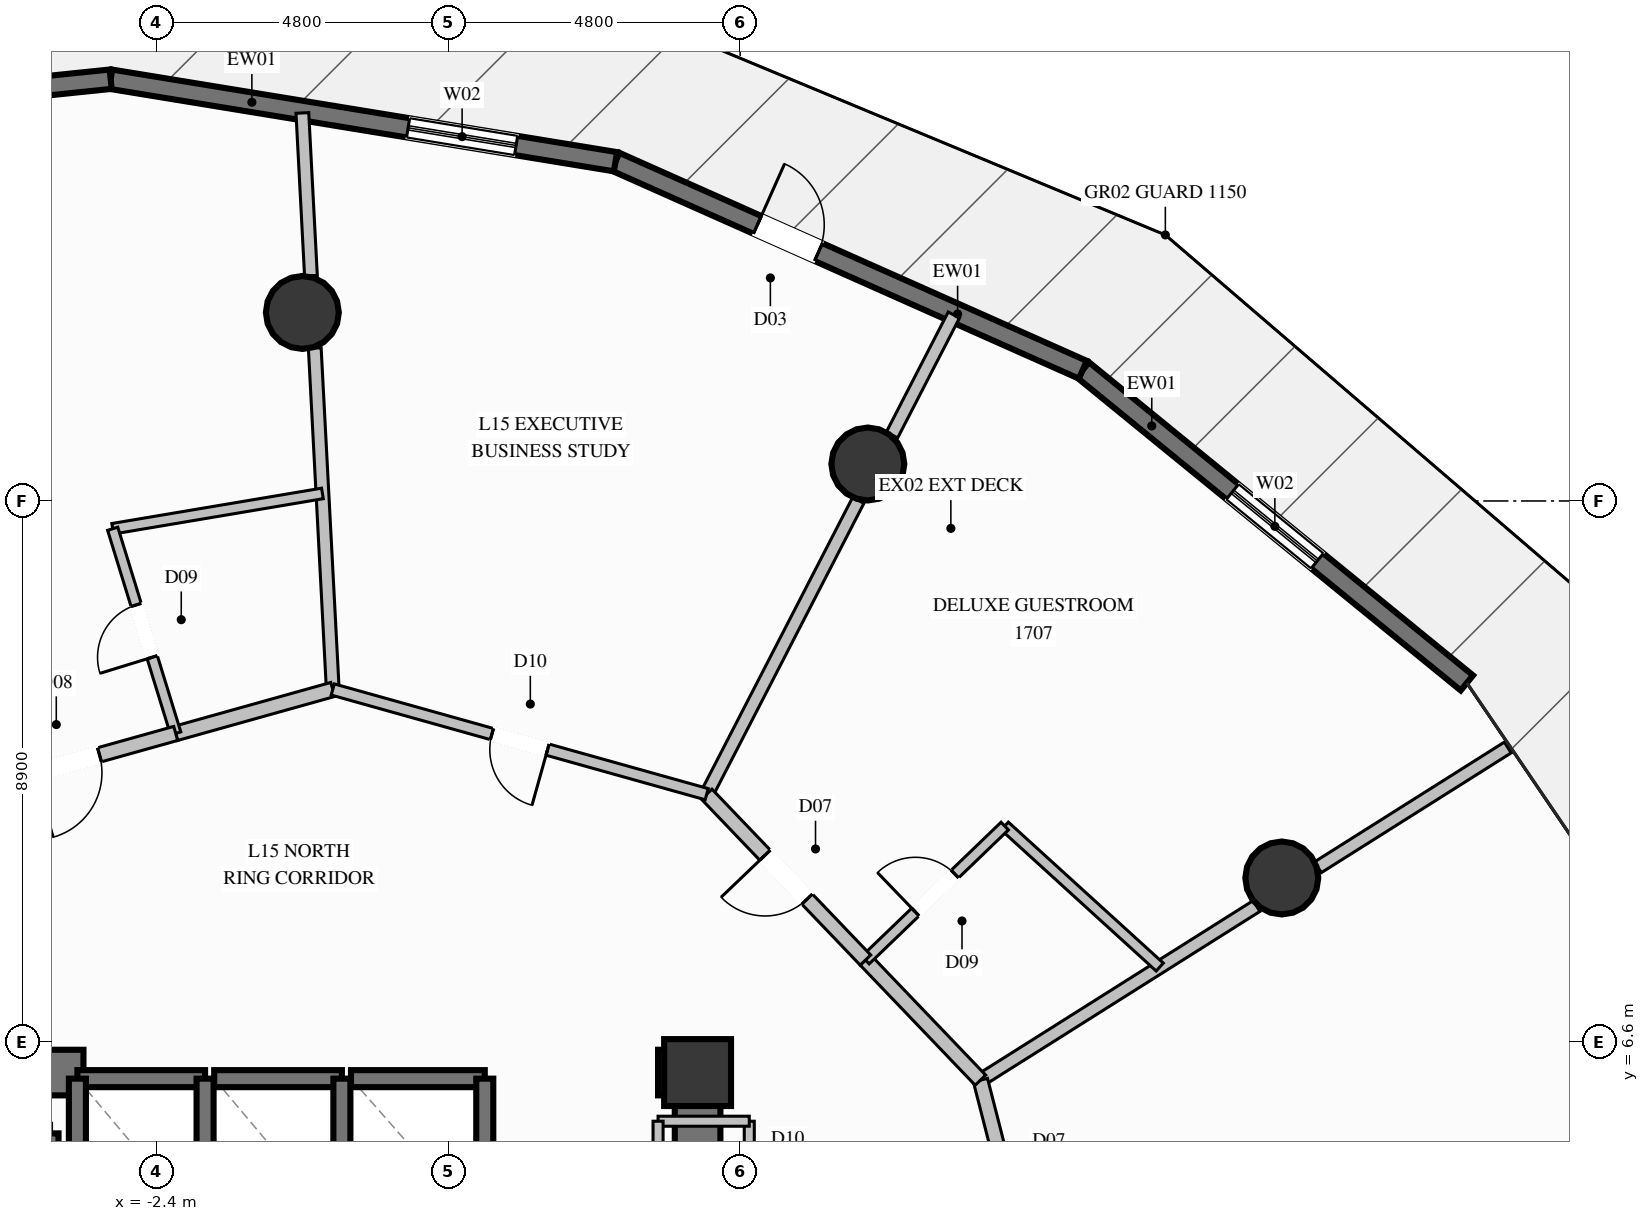
"""IFC4 building model, lengths in metres.
Left out: names, types, materials, properties, quantities, classifications, styles, units other than length and angle.
Written with IfcOpenShell. Run it as: python <this file> out.ifc"""

import sys

from ifc_helpers import new_model, si_unit, direction, frame, frame_2d, origin, origin_2d, place, context, subcontext, project, spatial, rectangle, circle, extrude, element, fill, save


model = new_model("IFC4")
c1 = context("Model", 3, precision=1e-05, world=origin(), true_north=direction((0.0, 1.0)))
c2 = subcontext(c1, "Body", "Model", "MODEL_VIEW")
j1 = project(units=[si_unit("LENGTHUNIT", "METRE"), si_unit("PLANEANGLEUNIT", "RADIAN")], contexts=[c1])
p1 = place(None, origin())
s1 = spatial("IfcSite", under=j1, at=p1, CompositionType="ELEMENT")
p2 = place(p1, origin())
s2 = spatial("IfcBuilding", under=s1, at=p2, CompositionType="ELEMENT")
p3 = place(p2, frame((0.0, 0.0, 64.4)))
s3 = spatial("IfcBuildingStorey", under=s2, at=p3, CompositionType="ELEMENT", Elevation=64.4)
p4 = place(p3, frame((6.5, 6.1, 0.0), z_axis=(0.0, 0.0, 1.0), x_axis=(1.0, 0.0, 0.0)))
e1 = element("IfcColumn", 1, at=p4, inside=s3, PredefinedType="COLUMN", context=c2, shape_type="SweptSolid", body=[
    extrude(rectangle(XDim=1.1, YDim=1.1, at=origin_2d()), origin(), (0.0, 0.0, 1.0), 3.6),
])
p5 = place(p3, frame((-6.125, 6.1, 0.0), z_axis=(0.0, 0.0, 1.0), x_axis=(1.0, 0.0, 0.0)))
e2 = element("IfcWall", 2, at=p5, inside=s3, PredefinedType="SHEAR", context=c2, shape_type="SweptSolid", body=[
    extrude(rectangle(XDim=2.525, YDim=0.75, at=frame_2d((1.262, 0.0))), origin(), (0.0, 0.0, 1.0), 3.6),
])
p6 = place(p3, frame((5.85, 6.1, 0.0), z_axis=(0.0, 0.0, 1.0), x_axis=(1.0, 0.0, 0.0)))
e3 = element("IfcWall", 3, at=p6, inside=s3, PredefinedType="SHEAR", context=c2, shape_type="SweptSolid", body=[
    extrude(rectangle(XDim=0.275, YDim=0.75, at=frame_2d((0.137, 0.0))), origin(), (0.0, 0.0, 1.0), 3.6),
])
p7 = place(p3, frame((6.5, 3.35, 0.0), z_axis=(0.0, 0.0, 1.0), x_axis=(0.0, 1.0, 0.0)))
e4 = element("IfcWall", 4, at=p7, inside=s3, PredefinedType="SHEAR", context=c2, shape_type="SweptSolid", body=[
    extrude(rectangle(XDim=3.125, YDim=0.75, at=frame_2d((1.562, 0.0))), origin(), (0.0, 0.0, 1.0), 3.6),
])
for number, where, z_axis, x_axis in (
    (5, (16.108, 9.3, 0.0), (0.0, 0.0, 1.0), (1.0, 0.0, 0.0)),
    (6, (9.3, 16.108, 0.0), (0.0, 0.0, 1.0), (1.0, 0.0, 0.0)),
    (7, (0.0, 18.6, 0.0), (0.0, 0.0, 1.0), (1.0, 0.0, 0.0)),
):
    element("IfcColumn", number, at=place(p3, frame(where, z_axis=z_axis, x_axis=x_axis)), inside=s3, PredefinedType="COLUMN", context=c2, shape_type="SweptSolid", body=[
        extrude(circle(Radius=0.6, at=origin_2d()), origin(), (0.0, 0.0, 1.0), 3.6),
    ])
p8 = place(p3, frame((12.836, 17.658, 0.0), z_axis=(0.0, 0.0, 1.0), x_axis=(0.775030651079, -0.631923642451, 0.0)))
e8 = element("IfcWall", 8, at=p8, inside=s3, PredefinedType="SOLIDWALL", context=c2, shape_type="SweptSolid", body=[
    extrude(rectangle(XDim=8.15, YDim=0.32, at=frame_2d((4.075, 0.0))), origin(), (0.0, 0.0, 1.0), 3.34),
])
p9 = place(p8, frame((3.175, 0.0, 0.35)))
e9 = element("IfcOpeningElement", 9, at=p9, cuts=e8, PredefinedType="OPENING", context=c2, shape_type="SweptSolid", body=[
    extrude(rectangle(XDim=1.8, YDim=2.6, at=frame_2d((0.9, 1.3))), frame((0.0, 0.17, 0.0), z_axis=(0.0, -1.0, 0.0), x_axis=(1.0, 0.0, 0.0)), (0.0, 0.0, 1.0), 0.34),
])
p10 = place(p3, frame((5.15, 21.079, 0.0), z_axis=(0.0, 0.0, 1.0), x_axis=(0.913585235978, -0.406647287712, 0.0)))
e10 = element("IfcWall", 10, at=p10, inside=s3, PredefinedType="SOLIDWALL", context=c2, shape_type="SweptSolid", body=[
    extrude(rectangle(XDim=8.413, YDim=0.32, at=frame_2d((4.207, 0.0))), origin(), (0.0, 0.0, 1.0), 3.34),
])
p11 = place(p10, frame((2.554, 0.0, 0.0)))
e11 = element("IfcOpeningElement", 11, at=p11, cuts=e10, PredefinedType="OPENING", context=c2, shape_type="SweptSolid", body=[
    extrude(rectangle(XDim=1.1, YDim=2.2, at=frame_2d((0.55, 1.1))), frame((0.0, 0.17, 0.0), z_axis=(0.0, -1.0, 0.0), x_axis=(1.0, 0.0, 0.0)), (0.0, 0.0, 1.0), 0.34),
])
p12 = place(p3, frame((-3.153, 22.436, 0.0), z_axis=(0.0, 0.0, 1.0), x_axis=(0.986907440065, -0.161287645973, 0.0)))
e12 = element("IfcWall", 12, at=p12, inside=s3, PredefinedType="SOLIDWALL", context=c2, shape_type="SweptSolid", body=[
    extrude(rectangle(XDim=8.413, YDim=0.32, at=frame_2d((4.207, 0.0))), origin(), (0.0, 0.0, 1.0), 3.34),
])
p13 = place(p12, frame((4.957, 0.0, 0.35)))
e13 = element("IfcOpeningElement", 13, at=p13, cuts=e12, PredefinedType="OPENING", context=c2, shape_type="SweptSolid", body=[
    extrude(rectangle(XDim=1.8, YDim=2.6, at=frame_2d((0.9, 1.3))), frame((0.0, 0.17, 0.0), z_axis=(0.0, -1.0, 0.0), x_axis=(1.0, 0.0, 0.0)), (0.0, 0.0, 1.0), 0.34),
])
p14 = place(p3, frame((-11.259, 21.598, 0.0), z_axis=(0.0, 0.0, 1.0), x_axis=(0.994696973701, 0.102849066644, 0.0)))
e14 = element("IfcWall", 14, at=p14, inside=s3, PredefinedType="SOLIDWALL", context=c2, shape_type="SweptSolid", body=[
    extrude(rectangle(XDim=8.149, YDim=0.32, at=frame_2d((4.075, 0.0))), origin(), (0.0, 0.0, 1.0), 3.34),
])
p15 = place(p14, frame((3.175, 0.0, 0.35)))
e15 = element("IfcOpeningElement", 15, at=p15, cuts=e14, PredefinedType="OPENING", context=c2, shape_type="SweptSolid", body=[
    extrude(rectangle(XDim=1.8, YDim=2.6, at=frame_2d((0.9, 1.3))), frame((0.0, 0.17, 0.0), z_axis=(0.0, -1.0, 0.0), x_axis=(1.0, 0.0, 0.0)), (0.0, 0.0, 1.0), 0.34),
])
p16 = place(p3, frame((-1.6, 6.0, 0.0), z_axis=(0.0, 0.0, 1.0), x_axis=(-1.0, 0.0, 0.0)))
e16 = element("IfcWall", 16, at=p16, inside=s3, PredefinedType="SOLIDWALL", context=c2, shape_type="SweptSolid", body=[
    extrude(rectangle(XDim=2.1, YDim=0.28, at=frame_2d((1.05, 0.0))), origin(), (0.0, 0.0, 1.0), 3.34),
])
for number, where, z_axis, x_axis in (
    (17, (-3.7, 6.0, 0.0), (0.0, 0.0, 1.0), (0.0, -1.0, 0.0)),
    (18, (-1.6, 3.5, 0.0), (0.0, 0.0, 1.0), (0.0, 1.0, 0.0)),
):
    element("IfcWall", number, at=place(p3, frame(where, z_axis=z_axis, x_axis=x_axis)), inside=s3, PredefinedType="SOLIDWALL", context=c2, shape_type="SweptSolid", body=[
        extrude(rectangle(XDim=2.5, YDim=0.28, at=frame_2d((1.25, 0.0))), origin(), (0.0, 0.0, 1.0), 3.34),
    ])
p17 = place(p3, frame((0.65, 6.0, 0.0), z_axis=(0.0, 0.0, 1.0), x_axis=(-1.0, 0.0, 0.0)))
e19 = element("IfcWall", 19, at=p17, inside=s3, PredefinedType="SOLIDWALL", context=c2, shape_type="SweptSolid", body=[
    extrude(rectangle(XDim=2.1, YDim=0.28, at=frame_2d((1.05, 0.0))), origin(), (0.0, 0.0, 1.0), 3.34),
])
p18 = place(p3, frame((0.65, 3.5, 0.0), z_axis=(0.0, 0.0, 1.0), x_axis=(0.0, 1.0, 0.0)))
e20 = element("IfcWall", 20, at=p18, inside=s3, PredefinedType="SOLIDWALL", context=c2, shape_type="SweptSolid", body=[
    extrude(rectangle(XDim=2.5, YDim=0.28, at=frame_2d((1.25, 0.0))), origin(), (0.0, 0.0, 1.0), 3.34),
])
p19 = place(p3, frame((3.0, 6.0, 0.0), z_axis=(0.0, 0.0, 1.0), x_axis=(-1.0, 0.0, 0.0)))
e21 = element("IfcWall", 21, at=p19, inside=s3, PredefinedType="SOLIDWALL", context=c2, shape_type="SweptSolid", body=[
    extrude(rectangle(XDim=2.2, YDim=0.28, at=frame_2d((1.1, 0.0))), origin(), (0.0, 0.0, 1.0), 3.34),
])
p20 = place(p3, frame((3.0, 3.5, 0.0), z_axis=(0.0, 0.0, 1.0), x_axis=(0.0, 1.0, 0.0)))
e22 = element("IfcWall", 22, at=p20, inside=s3, PredefinedType="SOLIDWALL", context=c2, shape_type="SweptSolid", body=[
    extrude(rectangle(XDim=2.5, YDim=0.28, at=frame_2d((1.25, 0.0))), origin(), (0.0, 0.0, 1.0), 3.34),
])
p21 = place(p3, frame((-4.15, 2.4, 0.0), z_axis=(0.0, 0.0, 1.0), x_axis=(0.0, 1.0, 0.0)))
e23 = element("IfcWall", 23, at=p21, inside=s3, PredefinedType="SOLIDWALL", context=c2, shape_type="SweptSolid", body=[
    extrude(rectangle(XDim=2.7, YDim=0.28, at=frame_2d((1.35, 0.0))), origin(), (0.0, 0.0, 1.0), 3.34),
])
p22 = place(p3, frame((7.35, 3.35, 0.0), z_axis=(0.0, 0.0, 1.0), x_axis=(0.0, 1.0, 0.0)))
e24 = element("IfcWall", 24, at=p22, inside=s3, PredefinedType="PARTITIONING", context=c2, shape_type="SweptSolid", body=[
    extrude(rectangle(XDim=1.95, YDim=0.165, at=frame_2d((0.975, 0.0))), origin(), (0.0, 0.0, 1.0), 3.34),
])
p23 = place(p22, frame((0.5, 0.0, 0.0)))
e25 = element("IfcOpeningElement", 25, at=p23, cuts=e24, PredefinedType="OPENING", context=c2, shape_type="SweptSolid", body=[
    extrude(rectangle(XDim=0.95, YDim=2.1, at=frame_2d((0.475, 1.05))), frame((0.0, 0.093, 0.0), z_axis=(0.0, -1.0, 0.0), x_axis=(1.0, 0.0, 0.0)), (0.0, 0.0, 1.0), 0.185),
])
p24 = place(p3, frame((7.35, 5.3, 0.0), z_axis=(0.0, 0.0, 1.0), x_axis=(-1.0, 0.0, 0.0)))
e26 = element("IfcWall", 26, at=p24, inside=s3, PredefinedType="PARTITIONING", context=c2, shape_type="SweptSolid", body=[
    extrude(rectangle(XDim=1.5, YDim=0.165, at=frame_2d((0.75, 0.0))), origin(), (0.0, 0.0, 1.0), 2.425),
])
p25 = place(p3, frame((5.85, 5.3, 0.0), z_axis=(0.0, 0.0, 1.0), x_axis=(0.0, -1.0, 0.0)))
e27 = element("IfcWall", 27, at=p25, inside=s3, PredefinedType="PARTITIONING", context=c2, shape_type="SweptSolid", body=[
    extrude(rectangle(XDim=1.95, YDim=0.165, at=frame_2d((0.975, 0.0))), origin(), (0.0, 0.0, 1.0), 2.425),
])
p26 = place(p3, frame((11.152, 5.975, 0.0), z_axis=(0.0, 0.0, 1.0), x_axis=(0.845824796296, 0.533460789535, 0.0)))
e28 = element("IfcWall", 28, at=p26, inside=s3, PredefinedType="PARTITIONING", context=c2, shape_type="SweptSolid", body=[
    extrude(rectangle(XDim=5.369, YDim=0.21, at=frame_2d((2.684, 0.0))), origin(), (0.0, 0.0, 1.0), 2.708),
])
p27 = place(p3, frame((16.702, 9.476, 0.0), z_axis=(0.0, 0.0, 1.0), x_axis=(0.845791996805, 0.533512790981, 0.0)))
e29 = element("IfcWall", 29, at=p27, inside=s3, PredefinedType="PARTITIONING", context=c2, shape_type="SweptSolid", body=[
    extrude(rectangle(XDim=3.692, YDim=0.21, at=frame_2d((1.846, 0.0))), origin(), (0.0, 0.0, 1.0), 3.34),
])
p28 = place(p3, frame((6.65, 10.678, 0.0), z_axis=(0.0, 0.0, 1.0), x_axis=(0.458459867615, 0.888715111713, 0.0)))
e30 = element("IfcWall", 30, at=p28, inside=s3, PredefinedType="PARTITIONING", context=c2, shape_type="SweptSolid", body=[
    extrude(rectangle(XDim=5.436, YDim=0.21, at=frame_2d((2.718, 0.0))), origin(), (0.0, 0.0, 1.0), 2.708),
])
p29 = place(p3, frame((9.697, 16.585, 0.0), z_axis=(0.0, 0.0, 1.0), x_axis=(0.458346114294, 0.888773784217, 0.0)))
e31 = element("IfcWall", 31, at=p29, inside=s3, PredefinedType="PARTITIONING", context=c2, shape_type="SweptSolid", body=[
    extrude(rectangle(XDim=2.221, YDim=0.21, at=frame_2d((1.111, 0.0))), origin(), (0.0, 0.0, 1.0), 3.34),
])
p30 = place(p3, frame((0.5, 12.4, 0.0), z_axis=(0.0, 0.0, 1.0), x_axis=(-0.052634051211, 0.998613867645, 0.0)))
e32 = element("IfcWall", 32, at=p30, inside=s3, PredefinedType="PARTITIONING", context=c2, shape_type="SweptSolid", body=[
    extrude(rectangle(XDim=5.622, YDim=0.21, at=frame_2d((2.811, 0.0))), origin(), (0.0, 0.0, 1.0), 2.708),
])
p31 = place(p3, frame((0.141, 19.204, 0.0), z_axis=(0.0, 0.0, 1.0), x_axis=(-0.052640094062, 0.998613549126, 0.0)))
e33 = element("IfcWall", 33, at=p31, inside=s3, PredefinedType="PARTITIONING", context=c2, shape_type="SweptSolid", body=[
    extrude(rectangle(XDim=2.681, YDim=0.21, at=frame_2d((1.34, 0.0))), origin(), (0.0, 0.0, 1.0), 3.34),
])
p32 = place(p3, frame((0.5, 12.4, 0.0), z_axis=(0.0, 0.0, 1.0), x_axis=(-0.962997098558, -0.269511758869, 0.0)))
e34 = element("IfcWall", 34, at=p32, inside=s3, PredefinedType="PARTITIONING", context=c2, shape_type="SweptSolid", body=[
    extrude(rectangle(XDim=2.682, YDim=0.24, at=frame_2d((1.341, 0.0))), origin(), (0.0, 0.0, 1.0), 2.917),
])
p33 = place(p3, frame((0.33, 15.624, 0.0), z_axis=(0.0, 0.0, 1.0), x_axis=(-0.986103759575, -0.166130597281, 0.0)))
e35 = element("IfcWall", 35, at=p33, inside=s3, PredefinedType="PLUMBINGWALL", context=c2, shape_type="SweptSolid", body=[
    extrude(rectangle(XDim=3.498, YDim=0.175, at=frame_2d((1.749, 0.0))), origin(), (0.0, 0.0, 1.0), 3.34),
])
p34 = place(p3, frame((-2.083, 11.677, 0.0), z_axis=(0.0, 0.0, 1.0), x_axis=(-0.294139433535, 0.955762519478, 0.0)))
e36 = element("IfcWall", 36, at=p34, inside=s3, PredefinedType="PLUMBINGWALL", context=c2, shape_type="SweptSolid", body=[
    extrude(rectangle(XDim=3.522, YDim=0.175, at=frame_2d((1.761, 0.0))), origin(), (0.0, 0.0, 1.0), 3.34),
])
p35 = place(p34, frame((1.311, 0.0, 0.0)))
e37 = element("IfcOpeningElement", 37, at=p35, cuts=e36, PredefinedType="OPENING", context=c2, shape_type="SweptSolid", body=[
    extrude(rectangle(XDim=0.9, YDim=2.1, at=frame_2d((0.45, 1.05))), frame((0.0, 0.098, 0.0), z_axis=(0.0, -1.0, 0.0), x_axis=(1.0, 0.0, 0.0)), (0.0, 0.0, 1.0), 0.195),
])
p36 = place(p3, frame((-2.083, 11.677, 0.0), z_axis=(0.0, 0.0, 1.0), x_axis=(-0.962943481199, -0.269703266603, 0.0)))
e38 = element("IfcWall", 38, at=p36, inside=s3, PredefinedType="PARTITIONING", context=c2, shape_type="SweptSolid", body=[
    extrude(rectangle(XDim=3.704, YDim=0.24, at=frame_2d((1.852, 0.0))), origin(), (0.0, 0.0, 1.0), 2.917),
])
p37 = place(p36, frame((1.302, 0.0, 0.0)))
e39 = element("IfcOpeningElement", 39, at=p37, cuts=e38, PredefinedType="OPENING", context=c2, shape_type="SweptSolid", body=[
    extrude(rectangle(XDim=1.1, YDim=2.3, at=frame_2d((0.55, 1.15))), frame((0.0, 0.13, 0.0), z_axis=(0.0, -1.0, 0.0), x_axis=(1.0, 0.0, 0.0)), (0.0, 0.0, 1.0), 0.26),
])
p38 = place(p3, frame((12.108, 2.248, 0.0), z_axis=(0.0, 0.0, 1.0), x_axis=(-0.248413515056, 0.9686540794, 0.0)))
e40 = element("IfcWall", 40, at=p38, inside=s3, PredefinedType="PARTITIONING", context=c2, shape_type="SweptSolid", body=[
    extrude(rectangle(XDim=3.848, YDim=0.24, at=frame_2d((1.924, 0.0))), origin(), (0.0, 0.0, 1.0), 2.917),
])
p39 = place(p38, frame((1.424, 0.0, 0.0)))
e41 = element("IfcOpeningElement", 41, at=p39, cuts=e40, PredefinedType="OPENING", context=c2, shape_type="SweptSolid", body=[
    extrude(rectangle(XDim=1.0, YDim=2.2, at=frame_2d((0.5, 1.1))), frame((0.0, 0.13, 0.0), z_axis=(0.0, -1.0, 0.0), x_axis=(1.0, 0.0, 0.0)), (0.0, 0.0, 1.0), 0.26),
])
p40 = place(p3, frame((11.152, 5.975, 0.0), z_axis=(0.0, 0.0, 1.0), x_axis=(-0.69162799291, 0.72225391617, 0.0)))
e42 = element("IfcWall", 42, at=p40, inside=s3, PredefinedType="PARTITIONING", context=c2, shape_type="SweptSolid", body=[
    extrude(rectangle(XDim=2.734, YDim=0.24, at=frame_2d((1.367, 0.0))), origin(), (0.0, 0.0, 1.0), 3.34),
])
p41 = place(p3, frame((14.101, 7.835, 0.0), z_axis=(0.0, 0.0, 1.0), x_axis=(-0.739686776135, 0.672951315632, 0.0)))
e43 = element("IfcWall", 43, at=p41, inside=s3, PredefinedType="PLUMBINGWALL", context=c2, shape_type="SweptSolid", body=[
    extrude(rectangle(XDim=3.446, YDim=0.175, at=frame_2d((1.723, 0.0))), origin(), (0.0, 0.0, 1.0), 3.34),
])
p42 = place(p3, frame((9.261, 7.95, 0.0), z_axis=(0.0, 0.0, 1.0), x_axis=(0.720644149621, 0.693305134567, 0.0)))
e44 = element("IfcWall", 44, at=p42, inside=s3, PredefinedType="PLUMBINGWALL", context=c2, shape_type="SweptSolid", body=[
    extrude(rectangle(XDim=3.179, YDim=0.175, at=frame_2d((1.59, 0.0))), origin(), (0.0, 0.0, 1.0), 3.34),
])
p43 = place(p42, frame((1.14, 0.0, 0.0)))
e45 = element("IfcOpeningElement", 45, at=p43, cuts=e44, PredefinedType="OPENING", context=c2, shape_type="SweptSolid", body=[
    extrude(rectangle(XDim=0.9, YDim=2.1, at=frame_2d((0.45, 1.05))), frame((0.0, 0.098, 0.0), z_axis=(0.0, -1.0, 0.0), x_axis=(1.0, 0.0, 0.0)), (0.0, 0.0, 1.0), 0.195),
])
p44 = place(p3, frame((9.261, 7.95, 0.0), z_axis=(0.0, 0.0, 1.0), x_axis=(-0.691453073155, 0.722421378161, 0.0)))
e46 = element("IfcWall", 46, at=p44, inside=s3, PredefinedType="PARTITIONING", context=c2, shape_type="SweptSolid", body=[
    extrude(rectangle(XDim=3.776, YDim=0.24, at=frame_2d((1.888, 0.0))), origin(), (0.0, 0.0, 1.0), 3.34),
])
p45 = place(p44, frame((1.388, 0.0, 0.0)))
e47 = element("IfcOpeningElement", 47, at=p45, cuts=e46, PredefinedType="OPENING", context=c2, shape_type="SweptSolid", body=[
    extrude(rectangle(XDim=1.0, YDim=2.2, at=frame_2d((0.5, 1.1))), frame((0.0, 0.13, 0.0), z_axis=(0.0, -1.0, 0.0), x_axis=(1.0, 0.0, 0.0)), (0.0, 0.0, 1.0), 0.26),
])
p46 = place(p3, frame((6.65, 10.678, 0.0), z_axis=(0.0, 0.0, 1.0), x_axis=(-0.962966004827, 0.26962283573, 0.0)))
e48 = element("IfcWall", 48, at=p46, inside=s3, PredefinedType="PARTITIONING", context=c2, shape_type="SweptSolid", body=[
    extrude(rectangle(XDim=6.386, YDim=0.19, at=frame_2d((3.193, 0.0))), origin(), (0.0, 0.0, 1.0), 2.917),
])
p47 = place(p46, frame((2.718, 0.0, 0.0)))
e49 = element("IfcOpeningElement", 49, at=p47, cuts=e48, PredefinedType="OPENING", context=c2, shape_type="SweptSolid", body=[
    extrude(rectangle(XDim=0.95, YDim=2.1, at=frame_2d((0.475, 1.05))), frame((0.0, 0.105, 0.0), z_axis=(0.0, -1.0, 0.0), x_axis=(1.0, 0.0, 0.0)), (0.0, 0.0, 1.0), 0.21),
])
p48 = place(p9, origin())
e50 = element("IfcWindow", 50, at=p48, inside=s3, PartitioningType="SINGLE_PANEL", PredefinedType="WINDOW", context=c2, shape_type="SweptSolid", body=[
    extrude(rectangle(XDim=1.8, YDim=2.6, at=frame_2d((0.9, 1.3))), frame((0.0, 0.03, 0.0), z_axis=(0.0, -1.0, 0.0), x_axis=(1.0, 0.0, 0.0)), (0.0, 0.0, 1.0), 0.06),
])
fill(e9, e50)
p49 = place(p11, origin())
e51 = element("IfcDoor", 51, at=p49, inside=s3, OperationType="SINGLE_SWING_LEFT", PredefinedType="DOOR", context=c2, shape_type="SweptSolid", body=[
    extrude(rectangle(XDim=1.1, YDim=2.2, at=frame_2d((0.55, 1.1))), frame((0.0, 0.025, 0.0), z_axis=(0.0, -1.0, 0.0), x_axis=(1.0, 0.0, 0.0)), (0.0, 0.0, 1.0), 0.05),
])
fill(e11, e51)
p50 = place(p13, origin())
e52 = element("IfcWindow", 52, at=p50, inside=s3, PartitioningType="SINGLE_PANEL", PredefinedType="WINDOW", context=c2, shape_type="SweptSolid", body=[
    extrude(rectangle(XDim=1.8, YDim=2.6, at=frame_2d((0.9, 1.3))), frame((0.0, 0.03, 0.0), z_axis=(0.0, -1.0, 0.0), x_axis=(1.0, 0.0, 0.0)), (0.0, 0.0, 1.0), 0.06),
])
fill(e13, e52)
p51 = place(p35, origin())
e53 = element("IfcDoor", 53, at=p51, inside=s3, OperationType="SINGLE_SWING_LEFT", PredefinedType="DOOR", context=c2, shape_type="SweptSolid", body=[
    extrude(rectangle(XDim=0.9, YDim=2.1, at=frame_2d((0.45, 1.05))), frame((0.0, 0.025, 0.0), z_axis=(0.0, -1.0, 0.0), x_axis=(1.0, 0.0, 0.0)), (0.0, 0.0, 1.0), 0.05),
])
fill(e37, e53)
p52 = place(p37, origin())
e54 = element("IfcDoor", 54, at=p52, inside=s3, OperationType="SINGLE_SWING_RIGHT", PredefinedType="DOOR", context=c2, shape_type="SweptSolid", body=[
    extrude(rectangle(XDim=1.1, YDim=2.3, at=frame_2d((0.55, 1.15))), frame((0.0, 0.025, 0.0), z_axis=(0.0, -1.0, 0.0), x_axis=(1.0, 0.0, 0.0)), (0.0, 0.0, 1.0), 0.05),
])
fill(e39, e54)
p53 = place(p43, origin())
e55 = element("IfcDoor", 55, at=p53, inside=s3, OperationType="SINGLE_SWING_LEFT", PredefinedType="DOOR", context=c2, shape_type="SweptSolid", body=[
    extrude(rectangle(XDim=0.9, YDim=2.1, at=frame_2d((0.45, 1.05))), frame((0.0, 0.025, 0.0), z_axis=(0.0, -1.0, 0.0), x_axis=(1.0, 0.0, 0.0)), (0.0, 0.0, 1.0), 0.05),
])
fill(e45, e55)
p54 = place(p45, origin())
e56 = element("IfcDoor", 56, at=p54, inside=s3, OperationType="SINGLE_SWING_RIGHT", PredefinedType="DOOR", context=c2, shape_type="SweptSolid", body=[
    extrude(rectangle(XDim=1.0, YDim=2.2, at=frame_2d((0.5, 1.1))), frame((0.0, 0.025, 0.0), z_axis=(0.0, -1.0, 0.0), x_axis=(1.0, 0.0, 0.0)), (0.0, 0.0, 1.0), 0.05),
])
fill(e47, e56)
p55 = place(p47, origin())
e57 = element("IfcDoor", 57, at=p55, inside=s3, OperationType="SINGLE_SWING_LEFT", PredefinedType="DOOR", context=c2, shape_type="SweptSolid", body=[
    extrude(rectangle(XDim=0.95, YDim=2.1, at=frame_2d((0.475, 1.05))), frame((0.0, 0.025, 0.0), z_axis=(0.0, -1.0, 0.0), x_axis=(1.0, 0.0, 0.0)), (0.0, 0.0, 1.0), 0.05),
])
fill(e49, e57)
save(model, sys.argv[1])
